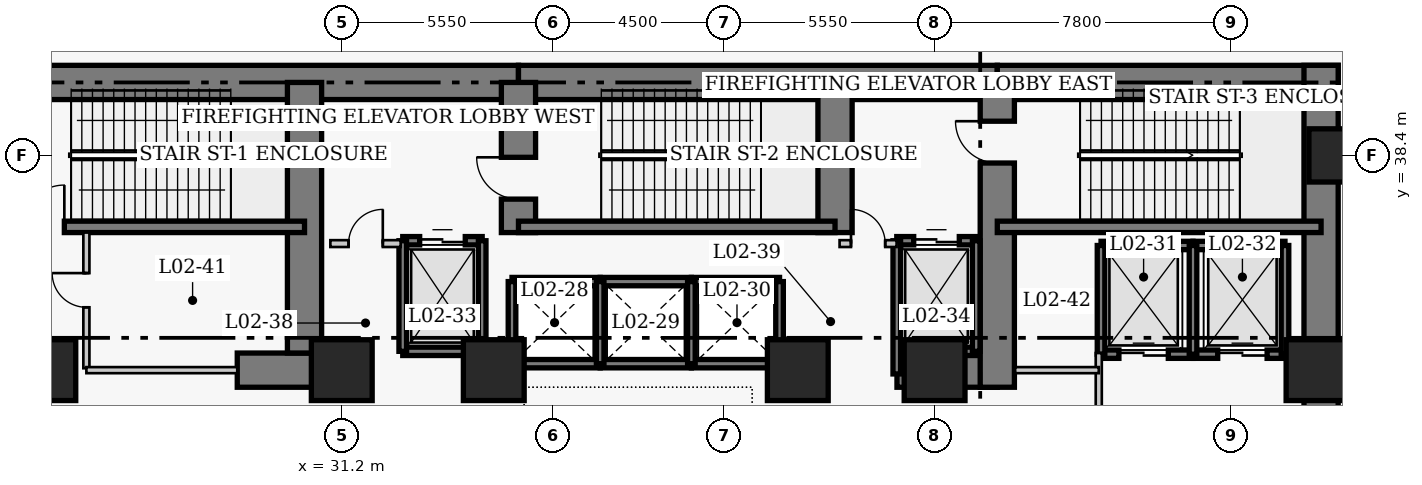
"""IFC4 building model, lengths in metres.
Left out: names, types, materials, properties, quantities, classifications, styles, units other than length and angle.
Written with IfcOpenShell. Run it as: python <this file> out.ifc"""

import sys

from ifc_helpers import new_model, si_unit, direction, frame, frame_2d, origin, origin_2d, place, context, subcontext, project, spatial, rectangle, extrude, element, fill, save


model = new_model("IFC4")
c1 = context("Model", 3, precision=1e-05, world=origin(), true_north=direction((0.0, 1.0)))
c2 = subcontext(c1, "Body", "Model", "MODEL_VIEW")
j1 = project(units=[si_unit("LENGTHUNIT", "METRE"), si_unit("PLANEANGLEUNIT", "RADIAN")], contexts=[c1])
p1 = place(None, origin())
s1 = spatial("IfcSite", under=j1, at=p1, CompositionType="ELEMENT")
p2 = place(p1, origin())
s2 = spatial("IfcBuilding", under=s1, at=p2, CompositionType="ELEMENT")
p3 = place(p2, frame((0.0, 0.0, 10.4)))
s3 = spatial("IfcBuildingStorey", under=s2, at=p3, CompositionType="ELEMENT", Elevation=10.4)
p4 = place(p3, frame((21.45, 40.32, 0.0), z_axis=(0.0, 0.0, 1.0), x_axis=(1.0, 0.0, 0.0)))
e1 = element("IfcWall", 1, at=p4, inside=s3, PredefinedType="SHEAR", context=c2, shape_type="SweptSolid", body=[
    extrude(rectangle(XDim=14.4, YDim=0.9, at=frame_2d((7.2, 0.0))), origin(), (0.0, 0.0, 1.0), 5.4),
])
p5 = place(p3, frame((35.85, 40.32, 0.0), z_axis=(0.0, 0.0, 1.0), x_axis=(1.0, 0.0, 0.0)))
e2 = element("IfcWall", 2, at=p5, inside=s3, PredefinedType="SHEAR", context=c2, shape_type="SweptSolid", body=[
    extrude(rectangle(XDim=12.6, YDim=0.9, at=frame_2d((6.3, 0.0))), origin(), (0.0, 0.0, 1.0), 5.4),
])
p6 = place(p3, frame((48.45, 40.32, 0.0), z_axis=(0.0, 0.0, 1.0), x_axis=(1.0, 0.0, 0.0)))
e3 = element("IfcWall", 3, at=p6, inside=s3, PredefinedType="SHEAR", context=c2, shape_type="SweptSolid", body=[
    extrude(rectangle(XDim=8.97, YDim=0.9, at=frame_2d((4.485, 0.0))), origin(), (0.0, 0.0, 1.0), 5.4),
])
p7 = place(p3, frame((56.97, 27.05, 0.0), z_axis=(0.0, 0.0, 1.0), x_axis=(0.0, 1.0, 0.0)))
e4 = element("IfcWall", 4, at=p7, inside=s3, PredefinedType="SHEAR", context=c2, shape_type="SweptSolid", body=[
    extrude(rectangle(XDim=13.72, YDim=0.9, at=frame_2d((6.86, 0.0))), origin(), (0.0, 0.0, 1.0), 5.4),
])
p8 = place(p3, frame((28.45, 32.75, 0.0), z_axis=(0.0, 0.0, 1.0), x_axis=(1.0, 0.0, 0.0)))
e5 = element("IfcWall", 5, at=p8, inside=s3, PredefinedType="SHEAR", context=c2, shape_type="SweptSolid", body=[
    extrude(rectangle(XDim=2.4, YDim=0.9, at=frame_2d((1.2, 0.0))), origin(), (0.0, 0.0, 1.0), 5.4),
])
p9 = place(p3, frame((45.81, 32.75, 0.0), z_axis=(0.0, 0.0, 1.0), x_axis=(1.0, 0.0, 0.0)))
e6 = element("IfcWall", 6, at=p9, inside=s3, PredefinedType="SHEAR", context=c2, shape_type="SweptSolid", body=[
    extrude(rectangle(XDim=2.64, YDim=0.9, at=frame_2d((1.32, 0.0))), origin(), (0.0, 0.0, 1.0), 5.4),
])
p10 = place(p3, frame((30.22, 33.2, 0.0), z_axis=(0.0, 0.0, 1.0), x_axis=(0.0, 1.0, 0.0)))
e7 = element("IfcWall", 7, at=p10, inside=s3, PredefinedType="SHEAR", context=c2, shape_type="SweptSolid", body=[
    extrude(rectangle(XDim=7.12, YDim=0.9, at=frame_2d((3.56, 0.0))), origin(), (0.0, 0.0, 1.0), 5.4),
])
p11 = place(p3, frame((35.85, 36.37, 0.0), z_axis=(0.0, 0.0, 1.0), x_axis=(0.0, 1.0, 0.0)))
e8 = element("IfcWall", 8, at=p11, inside=s3, PredefinedType="SHEAR", context=c2, shape_type="SweptSolid", body=[
    extrude(rectangle(XDim=3.95, YDim=0.9, at=frame_2d((1.975, 0.0))), origin(), (0.0, 0.0, 1.0), 5.4),
])
p12 = place(p11, frame((0.88, 0.0, 0.0)))
e9 = element("IfcOpeningElement", 9, at=p12, cuts=e8, PredefinedType="OPENING", context=c2, shape_type="SweptSolid", body=[
    extrude(rectangle(XDim=1.1, YDim=2.15, at=frame_2d((0.55, 1.075))), frame((0.0, 0.46, 0.0), z_axis=(0.0, -1.0, 0.0), x_axis=(1.0, 0.0, 0.0)), (0.0, 0.0, 1.0), 0.92),
])
p13 = place(p3, frame((44.18, 36.37, 0.0), z_axis=(0.0, 0.0, 1.0), x_axis=(0.0, 1.0, 0.0)))
e10 = element("IfcWall", 10, at=p13, inside=s3, PredefinedType="SHEAR", context=c2, shape_type="SweptSolid", body=[
    extrude(rectangle(XDim=3.95, YDim=0.9, at=frame_2d((1.975, 0.0))), origin(), (0.0, 0.0, 1.0), 5.4),
])
p14 = place(p3, frame((48.45, 32.3, 0.0), z_axis=(0.0, 0.0, 1.0), x_axis=(0.0, 1.0, 0.0)))
e11 = element("IfcWall", 11, at=p14, inside=s3, PredefinedType="SHEAR", context=c2, shape_type="SweptSolid", body=[
    extrude(rectangle(XDim=8.02, YDim=0.9, at=frame_2d((4.01, 0.0))), origin(), (0.0, 0.0, 1.0), 5.4),
])
p15 = place(p14, frame((5.9, 0.0, 0.0)))
e12 = element("IfcOpeningElement", 12, at=p15, cuts=e11, PredefinedType="OPENING", context=c2, shape_type="SweptSolid", body=[
    extrude(rectangle(XDim=1.1, YDim=2.15, at=frame_2d((0.55, 1.075))), frame((0.0, 0.46, 0.0), z_axis=(0.0, -1.0, 0.0), x_axis=(1.0, 0.0, 0.0)), (0.0, 0.0, 1.0), 0.92),
])
p16 = place(p3, frame((21.9, 36.52, 0.0), z_axis=(0.0, 0.0, 1.0), x_axis=(1.0, 0.0, 0.0)))
e13 = element("IfcWall", 13, at=p16, inside=s3, PredefinedType="SHEAR", context=c2, shape_type="SweptSolid", body=[
    extrude(rectangle(XDim=8.32, YDim=0.3, at=frame_2d((4.16, 0.0))), origin(), (0.0, 0.0, 1.0), 5.4),
])
p17 = place(p16, frame((0.9, 0.0, 0.0)))
e14 = element("IfcOpeningElement", 14, at=p17, cuts=e13, PredefinedType="OPENING", context=c2, shape_type="SweptSolid", body=[
    extrude(rectangle(XDim=1.1, YDim=2.15, at=frame_2d((0.55, 1.075))), frame((0.0, 0.16, 0.0), z_axis=(0.0, -1.0, 0.0), x_axis=(1.0, 0.0, 0.0)), (0.0, 0.0, 1.0), 0.32),
])
p18 = place(p3, frame((35.85, 36.52, 0.0), z_axis=(0.0, 0.0, 1.0), x_axis=(1.0, 0.0, 0.0)))
e15 = element("IfcWall", 15, at=p18, inside=s3, PredefinedType="SHEAR", context=c2, shape_type="SweptSolid", body=[
    extrude(rectangle(XDim=8.33, YDim=0.3, at=frame_2d((4.165, 0.0))), origin(), (0.0, 0.0, 1.0), 5.4),
])
p19 = place(p3, frame((48.45, 36.52, 0.0), z_axis=(0.0, 0.0, 1.0), x_axis=(1.0, 0.0, 0.0)))
e16 = element("IfcWall", 16, at=p19, inside=s3, PredefinedType="SHEAR", context=c2, shape_type="SweptSolid", body=[
    extrude(rectangle(XDim=8.52, YDim=0.3, at=frame_2d((4.26, 0.0))), origin(), (0.0, 0.0, 1.0), 5.4),
])
p20 = place(p3, frame((57.35, 38.4, 0.0), z_axis=(0.0, 0.0, 1.0), x_axis=(1.0, 0.0, 0.0)))
e17 = element("IfcColumn", 17, at=p20, inside=s3, PredefinedType="COLUMN", context=c2, shape_type="SweptSolid", body=[
    extrude(rectangle(XDim=1.4, YDim=1.4, at=origin_2d()), origin(), (0.0, 0.0, 1.0), 5.4),
])
for number, where, z_axis, x_axis in (
    (18, (23.4, 32.75, 0.0), (0.0, 0.0, 1.0), (1.0, 0.0, 0.0)),
    (19, (31.2, 32.75, 0.0), (0.0, 0.0, 1.0), (1.0, 0.0, 0.0)),
    (20, (35.2, 32.75, 0.0), (0.0, 0.0, 1.0), (1.0, 0.0, 0.0)),
    (21, (43.2, 32.75, 0.0), (0.0, 0.0, 1.0), (1.0, 0.0, 0.0)),
    (22, (46.8, 32.75, 0.0), (0.0, 0.0, 1.0), (1.0, 0.0, 0.0)),
    (23, (56.85, 32.75, 0.0), (0.0, 0.0, 1.0), (1.0, 0.0, 0.0)),
):
    element("IfcColumn", number, at=place(p3, frame(where, z_axis=z_axis, x_axis=x_axis)), inside=s3, PredefinedType="COLUMN", context=c2, shape_type="SweptSolid", body=[
        extrude(rectangle(XDim=1.6, YDim=1.6, at=origin_2d()), origin(), (0.0, 0.0, 1.0), 5.4),
    ])
for number, where, z_axis, x_axis in (
    (24, (35.68, 35.08, 0.0), (0.0, 0.0, 1.0), (1.0, 0.0, 0.0)),
    (25, (35.68, 32.92, 0.0), (0.0, 0.0, 1.0), (1.0, 0.0, 0.0)),
):
    element("IfcWall", number, at=place(p3, frame(where, z_axis=z_axis, x_axis=x_axis)), inside=s3, PredefinedType="SHEAR", context=c2, shape_type="SweptSolid", body=[
        extrude(rectangle(XDim=2.32, YDim=0.22, at=frame_2d((1.16, 0.0))), origin(), (0.0, 0.0, 1.0), 5.4),
    ])
p21 = place(p3, frame((35.68, 32.92, 0.0), z_axis=(0.0, 0.0, 1.0), x_axis=(0.0, 1.0, 0.0)))
e26 = element("IfcWall", 26, at=p21, inside=s3, PredefinedType="SHEAR", context=c2, shape_type="SweptSolid", body=[
    extrude(rectangle(XDim=2.16, YDim=0.2, at=frame_2d((1.08, 0.0))), origin(), (0.0, 0.0, 1.0), 5.4),
])
for number, where, z_axis, x_axis in (
    (27, (38.0, 35.08, 0.0), (0.0, 0.0, 1.0), (1.0, 0.0, 0.0)),
    (28, (38.0, 32.92, 0.0), (0.0, 0.0, 1.0), (1.0, 0.0, 0.0)),
):
    element("IfcWall", number, at=place(p3, frame(where, z_axis=z_axis, x_axis=x_axis)), inside=s3, PredefinedType="SHEAR", context=c2, shape_type="SweptSolid", body=[
        extrude(rectangle(XDim=2.4, YDim=0.22, at=frame_2d((1.2, 0.0))), origin(), (0.0, 0.0, 1.0), 5.4),
    ])
p22 = place(p3, frame((38.0, 32.92, 0.0), z_axis=(0.0, 0.0, 1.0), x_axis=(0.0, 1.0, 0.0)))
e29 = element("IfcWall", 29, at=p22, inside=s3, PredefinedType="SHEAR", context=c2, shape_type="SweptSolid", body=[
    extrude(rectangle(XDim=2.16, YDim=0.2, at=frame_2d((1.08, 0.0))), origin(), (0.0, 0.0, 1.0), 5.4),
])
for number, where, z_axis, x_axis in (
    (30, (40.4, 35.08, 0.0), (0.0, 0.0, 1.0), (1.0, 0.0, 0.0)),
    (31, (40.4, 32.92, 0.0), (0.0, 0.0, 1.0), (1.0, 0.0, 0.0)),
):
    element("IfcWall", number, at=place(p3, frame(where, z_axis=z_axis, x_axis=x_axis)), inside=s3, PredefinedType="SHEAR", context=c2, shape_type="SweptSolid", body=[
        extrude(rectangle(XDim=2.32, YDim=0.22, at=frame_2d((1.16, 0.0))), origin(), (0.0, 0.0, 1.0), 5.4),
    ])
for number, where, z_axis, x_axis in (
    (32, (40.4, 32.92, 0.0), (0.0, 0.0, 1.0), (0.0, 1.0, 0.0)),
    (33, (42.72, 32.92, 0.0), (0.0, 0.0, 1.0), (0.0, 1.0, 0.0)),
):
    element("IfcWall", number, at=place(p3, frame(where, z_axis=z_axis, x_axis=x_axis)), inside=s3, PredefinedType="SHEAR", context=c2, shape_type="SweptSolid", body=[
        extrude(rectangle(XDim=2.16, YDim=0.2, at=frame_2d((1.08, 0.0))), origin(), (0.0, 0.0, 1.0), 5.4),
    ])
p23 = place(p3, frame((51.18, 36.03, 0.0), z_axis=(0.0, 0.0, 1.0), x_axis=(1.0, 0.0, 0.0)))
e34 = element("IfcWall", 34, at=p23, inside=s3, PredefinedType="SHEAR", context=c2, shape_type="SweptSolid", body=[
    extrude(rectangle(XDim=2.42, YDim=0.22, at=frame_2d((1.21, 0.0))), origin(), (0.0, 0.0, 1.0), 5.4),
])
p24 = place(p3, frame((51.18, 33.17, 0.0), z_axis=(0.0, 0.0, 1.0), x_axis=(1.0, 0.0, 0.0)))
e35 = element("IfcWall", 35, at=p24, inside=s3, PredefinedType="SHEAR", context=c2, shape_type="SweptSolid", body=[
    extrude(rectangle(XDim=2.42, YDim=0.22, at=frame_2d((1.21, 0.0))), origin(), (0.0, 0.0, 1.0), 5.4),
])
p25 = place(p24, frame((0.47, 0.0, 0.0)))
e36 = element("IfcOpeningElement", 36, at=p25, cuts=e35, PredefinedType="OPENING", context=c2, shape_type="SweptSolid", body=[
    extrude(rectangle(XDim=1.3, YDim=2.15, at=frame_2d((0.65, 1.075))), frame((0.0, 0.12, 0.0), z_axis=(0.0, -1.0, 0.0), x_axis=(1.0, 0.0, 0.0)), (0.0, 0.0, 1.0), 0.24),
])
p26 = place(p3, frame((51.18, 33.17, 0.0), z_axis=(0.0, 0.0, 1.0), x_axis=(0.0, 1.0, 0.0)))
e37 = element("IfcWall", 37, at=p26, inside=s3, PredefinedType="SHEAR", context=c2, shape_type="SweptSolid", body=[
    extrude(rectangle(XDim=2.86, YDim=0.2, at=frame_2d((1.43, 0.0))), origin(), (0.0, 0.0, 1.0), 5.4),
])
p27 = place(p3, frame((53.6, 36.03, 0.0), z_axis=(0.0, 0.0, 1.0), x_axis=(1.0, 0.0, 0.0)))
e38 = element("IfcWall", 38, at=p27, inside=s3, PredefinedType="SHEAR", context=c2, shape_type="SweptSolid", body=[
    extrude(rectangle(XDim=2.42, YDim=0.22, at=frame_2d((1.21, 0.0))), origin(), (0.0, 0.0, 1.0), 5.4),
])
p28 = place(p3, frame((53.6, 33.17, 0.0), z_axis=(0.0, 0.0, 1.0), x_axis=(1.0, 0.0, 0.0)))
e39 = element("IfcWall", 39, at=p28, inside=s3, PredefinedType="SHEAR", context=c2, shape_type="SweptSolid", body=[
    extrude(rectangle(XDim=2.42, YDim=0.22, at=frame_2d((1.21, 0.0))), origin(), (0.0, 0.0, 1.0), 5.4),
])
p29 = place(p28, frame((0.65, 0.0, 0.0)))
e40 = element("IfcOpeningElement", 40, at=p29, cuts=e39, PredefinedType="OPENING", context=c2, shape_type="SweptSolid", body=[
    extrude(rectangle(XDim=1.3, YDim=2.15, at=frame_2d((0.65, 1.075))), frame((0.0, 0.12, 0.0), z_axis=(0.0, -1.0, 0.0), x_axis=(1.0, 0.0, 0.0)), (0.0, 0.0, 1.0), 0.24),
])
for number, where, z_axis, x_axis in (
    (41, (53.6, 33.17, 0.0), (0.0, 0.0, 1.0), (0.0, 1.0, 0.0)),
    (42, (56.02, 33.17, 0.0), (0.0, 0.0, 1.0), (0.0, 1.0, 0.0)),
):
    element("IfcWall", number, at=place(p3, frame(where, z_axis=z_axis, x_axis=x_axis)), inside=s3, PredefinedType="SHEAR", context=c2, shape_type="SweptSolid", body=[
        extrude(rectangle(XDim=2.86, YDim=0.2, at=frame_2d((1.43, 0.0))), origin(), (0.0, 0.0, 1.0), 5.4),
    ])
p30 = place(p3, frame((32.805, 36.155, 0.0), z_axis=(0.0, 0.0, 1.0), x_axis=(1.0, 0.0, 0.0)))
e43 = element("IfcWall", 43, at=p30, inside=s3, PredefinedType="SHEAR", context=c2, shape_type="SweptSolid", body=[
    extrude(rectangle(XDim=2.09, YDim=0.22, at=frame_2d((1.045, 0.0))), origin(), (0.0, 0.0, 1.0), 5.4),
])
p31 = place(p30, frame((0.445, 0.0, 0.0)))
e44 = element("IfcOpeningElement", 44, at=p31, cuts=e43, PredefinedType="OPENING", context=c2, shape_type="SweptSolid", body=[
    extrude(rectangle(XDim=1.2, YDim=2.15, at=frame_2d((0.6, 1.075))), frame((0.0, 0.12, 0.0), z_axis=(0.0, -1.0, 0.0), x_axis=(1.0, 0.0, 0.0)), (0.0, 0.0, 1.0), 0.24),
])
p32 = place(p3, frame((32.805, 33.245, 0.0), z_axis=(0.0, 0.0, 1.0), x_axis=(1.0, 0.0, 0.0)))
e45 = element("IfcWall", 45, at=p32, inside=s3, PredefinedType="SHEAR", context=c2, shape_type="SweptSolid", body=[
    extrude(rectangle(XDim=2.09, YDim=0.22, at=frame_2d((1.045, 0.0))), origin(), (0.0, 0.0, 1.0), 5.4),
])
for number, where, z_axis, x_axis in (
    (46, (32.805, 33.245, 0.0), (0.0, 0.0, 1.0), (0.0, 1.0, 0.0)),
    (47, (34.895, 33.245, 0.0), (0.0, 0.0, 1.0), (0.0, 1.0, 0.0)),
):
    element("IfcWall", number, at=place(p3, frame(where, z_axis=z_axis, x_axis=x_axis)), inside=s3, PredefinedType="SHEAR", context=c2, shape_type="SweptSolid", body=[
        extrude(rectangle(XDim=2.91, YDim=0.2, at=frame_2d((1.455, 0.0))), origin(), (0.0, 0.0, 1.0), 5.4),
    ])
p33 = place(p3, frame((45.805, 36.155, 0.0), z_axis=(0.0, 0.0, 1.0), x_axis=(1.0, 0.0, 0.0)))
e48 = element("IfcWall", 48, at=p33, inside=s3, PredefinedType="SHEAR", context=c2, shape_type="SweptSolid", body=[
    extrude(rectangle(XDim=2.09, YDim=0.22, at=frame_2d((1.045, 0.0))), origin(), (0.0, 0.0, 1.0), 5.4),
])
p34 = place(p33, frame((0.445, 0.0, 0.0)))
e49 = element("IfcOpeningElement", 49, at=p34, cuts=e48, PredefinedType="OPENING", context=c2, shape_type="SweptSolid", body=[
    extrude(rectangle(XDim=1.2, YDim=2.15, at=frame_2d((0.6, 1.075))), frame((0.0, 0.12, 0.0), z_axis=(0.0, -1.0, 0.0), x_axis=(1.0, 0.0, 0.0)), (0.0, 0.0, 1.0), 0.24),
])
p35 = place(p3, frame((45.805, 33.245, 0.0), z_axis=(0.0, 0.0, 1.0), x_axis=(1.0, 0.0, 0.0)))
e50 = element("IfcWall", 50, at=p35, inside=s3, PredefinedType="SHEAR", context=c2, shape_type="SweptSolid", body=[
    extrude(rectangle(XDim=2.09, YDim=0.22, at=frame_2d((1.045, 0.0))), origin(), (0.0, 0.0, 1.0), 5.4),
])
p36 = place(p3, frame((45.805, 32.65, 0.0), z_axis=(0.0, 0.0, 1.0), x_axis=(0.0, 1.0, 0.0)))
e51 = element("IfcWall", 51, at=p36, inside=s3, PredefinedType="SHEAR", context=c2, shape_type="SweptSolid", body=[
    extrude(rectangle(XDim=3.505, YDim=0.2, at=frame_2d((1.752, 0.0))), origin(), (0.0, 0.0, 1.0), 5.4),
])
p37 = place(p3, frame((47.895, 33.245, 0.0), z_axis=(0.0, 0.0, 1.0), x_axis=(0.0, 1.0, 0.0)))
e52 = element("IfcWall", 52, at=p37, inside=s3, PredefinedType="SHEAR", context=c2, shape_type="SweptSolid", body=[
    extrude(rectangle(XDim=2.91, YDim=0.2, at=frame_2d((1.455, 0.0))), origin(), (0.0, 0.0, 1.0), 5.4),
])
p38 = place(p3, frame((30.9, 36.08, 0.0), z_axis=(0.0, 0.0, 1.0), x_axis=(1.0, 0.0, 0.0)))
e53 = element("IfcWall", 53, at=p38, inside=s3, PredefinedType="PARTITIONING", context=c2, shape_type="SweptSolid", body=[
    extrude(rectangle(XDim=1.85, YDim=0.18, at=frame_2d((0.925, 0.0))), origin(), (0.0, 0.0, 1.0), 5.1),
])
p39 = place(p38, frame((0.48, 0.0, 0.0)))
e54 = element("IfcOpeningElement", 54, at=p39, cuts=e53, PredefinedType="OPENING", context=c2, shape_type="SweptSolid", body=[
    extrude(rectangle(XDim=0.9, YDim=2.15, at=frame_2d((0.45, 1.075))), frame((0.0, 0.1, 0.0), z_axis=(0.0, -1.0, 0.0), x_axis=(1.0, 0.0, 0.0)), (0.0, 0.0, 1.0), 0.2),
])
p40 = place(p3, frame((44.3, 36.08, 0.0), z_axis=(0.0, 0.0, 1.0), x_axis=(1.0, 0.0, 0.0)))
e55 = element("IfcWall", 55, at=p40, inside=s3, PredefinedType="PARTITIONING", context=c2, shape_type="SweptSolid", body=[
    extrude(rectangle(XDim=1.5, YDim=0.18, at=frame_2d((0.75, 0.0))), origin(), (0.0, 0.0, 1.0), 5.1),
])
p41 = place(p40, frame((0.3, 0.0, 0.0)))
e56 = element("IfcOpeningElement", 56, at=p41, cuts=e55, PredefinedType="OPENING", context=c2, shape_type="SweptSolid", body=[
    extrude(rectangle(XDim=0.9, YDim=2.15, at=frame_2d((0.45, 1.075))), frame((0.0, 0.1, 0.0), z_axis=(0.0, -1.0, 0.0), x_axis=(1.0, 0.0, 0.0)), (0.0, 0.0, 1.0), 0.2),
])
p42 = place(p3, frame((24.48, 32.8, 0.0), z_axis=(0.0, 0.0, 1.0), x_axis=(0.0, 1.0, 0.0)))
e57 = element("IfcWall", 57, at=p42, inside=s3, PredefinedType="PARTITIONING", context=c2, shape_type="SweptSolid", body=[
    extrude(rectangle(XDim=3.57, YDim=0.16, at=frame_2d((1.785, 0.0))), origin(), (0.0, 0.0, 1.0), 5.1),
])
p43 = place(p42, frame((1.604, 0.0, 0.0)))
e58 = element("IfcOpeningElement", 58, at=p43, cuts=e57, PredefinedType="OPENING", context=c2, shape_type="SweptSolid", body=[
    extrude(rectangle(XDim=0.9, YDim=2.1, at=frame_2d((0.45, 1.05))), frame((0.0, 0.09, 0.0), z_axis=(0.0, -1.0, 0.0), x_axis=(1.0, 0.0, 0.0)), (0.0, 0.0, 1.0), 0.18),
])
p44 = place(p3, frame((51.12, 29.5, 0.0), z_axis=(0.0, 0.0, 1.0), x_axis=(0.0, 1.0, 0.0)))
e59 = element("IfcWall", 59, at=p44, inside=s3, PredefinedType="PARTITIONING", context=c2, shape_type="SweptSolid", body=[
    extrude(rectangle(XDim=3.7, YDim=0.16, at=frame_2d((1.85, 0.0))), origin(), (0.0, 0.0, 1.0), 5.1),
])
p45 = place(p44, frame((0.9, 0.0, 0.0)))
e60 = element("IfcOpeningElement", 60, at=p45, cuts=e59, PredefinedType="OPENING", context=c2, shape_type="SweptSolid", body=[
    extrude(rectangle(XDim=1.1, YDim=2.15, at=frame_2d((0.55, 1.075))), frame((0.0, 0.09, 0.0), z_axis=(0.0, -1.0, 0.0), x_axis=(1.0, 0.0, 0.0)), (0.0, 0.0, 1.0), 0.18),
])
p46 = place(p3, frame((24.48, 32.75, 0.0), z_axis=(0.0, 0.0, 1.0), x_axis=(1.0, 0.0, 0.0)))
e61 = element("IfcWall", 61, at=p46, inside=s3, PredefinedType="PARTITIONING", context=c2, shape_type="SweptSolid", body=[
    extrude(rectangle(XDim=3.97, YDim=0.16, at=frame_2d((1.985, 0.0))), origin(), (0.0, 0.0, 1.0), 5.1),
])
p47 = place(p3, frame((48.92, 32.75, 0.0), z_axis=(0.0, 0.0, 1.0), x_axis=(1.0, 0.0, 0.0)))
e62 = element("IfcWall", 62, at=p47, inside=s3, PredefinedType="PARTITIONING", context=c2, shape_type="SweptSolid", body=[
    extrude(rectangle(XDim=2.2, YDim=0.16, at=frame_2d((1.1, 0.0))), origin(), (0.0, 0.0, 1.0), 5.1),
])
p48 = place(p25, origin())
e63 = element("IfcDoor", 63, at=p48, inside=s3, OperationType="DOUBLE_DOOR_SLIDING", PredefinedType="DOOR", context=c2, shape_type="SweptSolid", body=[
    extrude(rectangle(XDim=1.3, YDim=2.15, at=frame_2d((0.65, 1.075))), frame((0.0, 0.025, 0.0), z_axis=(0.0, -1.0, 0.0), x_axis=(1.0, 0.0, 0.0)), (0.0, 0.0, 1.0), 0.05),
])
fill(e36, e63)
p49 = place(p29, origin())
e64 = element("IfcDoor", 64, at=p49, inside=s3, OperationType="DOUBLE_DOOR_SLIDING", PredefinedType="DOOR", context=c2, shape_type="SweptSolid", body=[
    extrude(rectangle(XDim=1.3, YDim=2.15, at=frame_2d((0.65, 1.075))), frame((0.0, 0.025, 0.0), z_axis=(0.0, -1.0, 0.0), x_axis=(1.0, 0.0, 0.0)), (0.0, 0.0, 1.0), 0.05),
])
fill(e40, e64)
p50 = place(p31, origin())
e65 = element("IfcDoor", 65, at=p50, inside=s3, OperationType="DOUBLE_DOOR_SLIDING", PredefinedType="DOOR", context=c2, shape_type="SweptSolid", body=[
    extrude(rectangle(XDim=1.2, YDim=2.15, at=frame_2d((0.6, 1.075))), frame((0.0, 0.025, 0.0), z_axis=(0.0, -1.0, 0.0), x_axis=(1.0, 0.0, 0.0)), (0.0, 0.0, 1.0), 0.05),
])
fill(e44, e65)
p51 = place(p34, origin())
e66 = element("IfcDoor", 66, at=p51, inside=s3, OperationType="DOUBLE_DOOR_SLIDING", PredefinedType="DOOR", context=c2, shape_type="SweptSolid", body=[
    extrude(rectangle(XDim=1.2, YDim=2.15, at=frame_2d((0.6, 1.075))), frame((0.0, 0.025, 0.0), z_axis=(0.0, -1.0, 0.0), x_axis=(1.0, 0.0, 0.0)), (0.0, 0.0, 1.0), 0.05),
])
fill(e49, e66)
p52 = place(p39, origin())
e67 = element("IfcDoor", 67, at=p52, inside=s3, OperationType="SINGLE_SWING_RIGHT", PredefinedType="DOOR", context=c2, shape_type="SweptSolid", body=[
    extrude(rectangle(XDim=0.9, YDim=2.15, at=frame_2d((0.45, 1.075))), frame((0.0, 0.025, 0.0), z_axis=(0.0, -1.0, 0.0), x_axis=(1.0, 0.0, 0.0)), (0.0, 0.0, 1.0), 0.05),
])
fill(e54, e67)
p53 = place(p41, origin())
e68 = element("IfcDoor", 68, at=p53, inside=s3, OperationType="SINGLE_SWING_LEFT", PredefinedType="DOOR", context=c2, shape_type="SweptSolid", body=[
    extrude(rectangle(XDim=0.9, YDim=2.15, at=frame_2d((0.45, 1.075))), frame((0.0, 0.025, 0.0), z_axis=(0.0, -1.0, 0.0), x_axis=(1.0, 0.0, 0.0)), (0.0, 0.0, 1.0), 0.05),
])
fill(e56, e68)
p54 = place(p43, origin())
e69 = element("IfcDoor", 69, at=p54, inside=s3, OperationType="SINGLE_SWING_RIGHT", PredefinedType="DOOR", context=c2, shape_type="SweptSolid", body=[
    extrude(rectangle(XDim=0.9, YDim=2.1, at=frame_2d((0.45, 1.05))), frame((0.0, 0.025, 0.0), z_axis=(0.0, -1.0, 0.0), x_axis=(1.0, 0.0, 0.0)), (0.0, 0.0, 1.0), 0.05),
])
fill(e58, e69)
p55 = place(p17, origin())
e70 = element("IfcDoor", 70, at=p55, inside=s3, OperationType="SINGLE_SWING_RIGHT", PredefinedType="DOOR", context=c2, shape_type="SweptSolid", body=[
    extrude(rectangle(XDim=1.1, YDim=2.15, at=frame_2d((0.55, 1.075))), frame((0.0, 0.025, 0.0), z_axis=(0.0, -1.0, 0.0), x_axis=(1.0, 0.0, 0.0)), (0.0, 0.0, 1.0), 0.05),
])
fill(e14, e70)
p56 = place(p12, origin())
e71 = element("IfcDoor", 71, at=p56, inside=s3, OperationType="SINGLE_SWING_RIGHT", PredefinedType="DOOR", context=c2, shape_type="SweptSolid", body=[
    extrude(rectangle(XDim=1.1, YDim=2.15, at=frame_2d((0.55, 1.075))), frame((0.0, 0.025, 0.0), z_axis=(0.0, -1.0, 0.0), x_axis=(1.0, 0.0, 0.0)), (0.0, 0.0, 1.0), 0.05),
])
fill(e9, e71)
p57 = place(p15, origin())
e72 = element("IfcDoor", 72, at=p57, inside=s3, OperationType="SINGLE_SWING_RIGHT", PredefinedType="DOOR", context=c2, shape_type="SweptSolid", body=[
    extrude(rectangle(XDim=1.1, YDim=2.15, at=frame_2d((0.55, 1.075))), frame((0.0, 0.025, 0.0), z_axis=(0.0, -1.0, 0.0), x_axis=(1.0, 0.0, 0.0)), (0.0, 0.0, 1.0), 0.05),
])
fill(e12, e72)
save(model, sys.argv[1])
